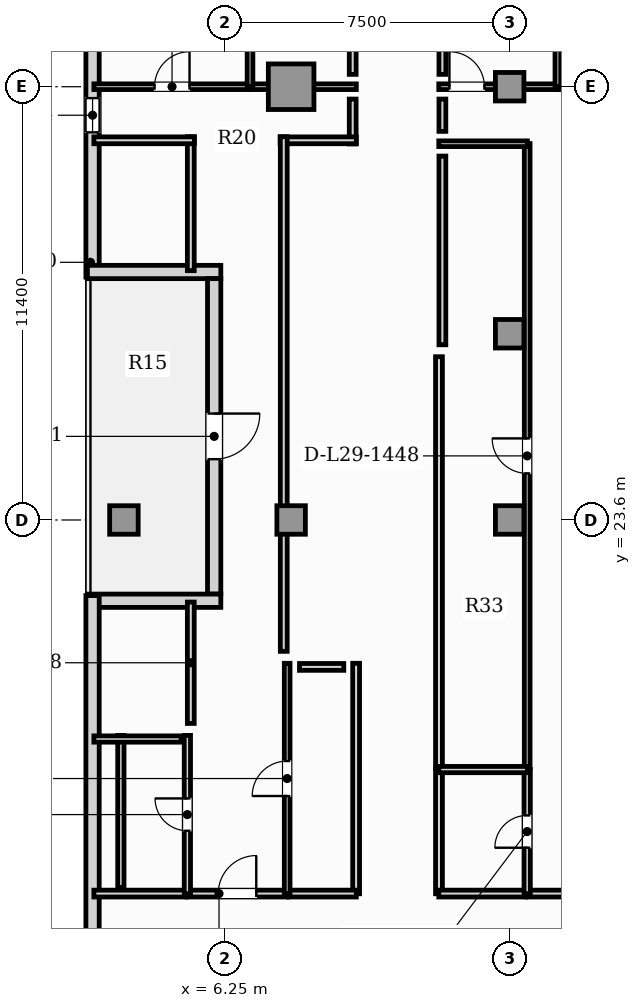
"""IFC4 building model, lengths in metres.
Left out: names, types, materials, properties, quantities, classifications, styles, units other than length and angle.
Written with IfcOpenShell. Run it as: python <this file> out.ifc"""

import sys

from ifc_helpers import new_model, si_unit, direction, frame, frame_2d, origin, origin_2d, place, context, subcontext, project, spatial, rectangle, hollow_rectangle, extrude, element, fill, save


model = new_model("IFC4")
c1 = context("Model", 3, precision=1e-05, world=origin(), true_north=direction((0.0, 1.0)))
c2 = subcontext(c1, "Body", "Model", "MODEL_VIEW")
j1 = project(units=[si_unit("LENGTHUNIT", "METRE"), si_unit("PLANEANGLEUNIT", "RADIAN")], contexts=[c1])
p1 = place(None, origin())
s1 = spatial("IfcSite", under=j1, at=p1, CompositionType="ELEMENT")
p2 = place(p1, origin())
s2 = spatial("IfcBuilding", under=s1, at=p2, CompositionType="ELEMENT")
p3 = place(p2, frame((0.0, 0.0, 119.55)))
s3 = spatial("IfcBuildingStorey", under=s2, at=p3, CompositionType="ELEMENT", Elevation=119.55)
p4 = place(p3, frame((8.0, 35.0, 0.0), z_axis=(0.0, 0.0, 1.0), x_axis=(1.0, 0.0, 0.0)))
e1 = element("IfcColumn", 1, at=p4, inside=s3, PredefinedType="USERDEFINED", context=c2, shape_type="SweptSolid", body=[
    extrude(hollow_rectangle(XDim=1.2, YDim=1.2, WallThickness=0.07, at=origin_2d()), origin(), (0.0, 0.0, 1.0), 3.85),
])
for number, where, z_axis, x_axis in (
    (2, (3.6, 23.6, 0.0), (0.0, 0.0, 1.0), (1.0, 0.0, 0.0)),
    (3, (8.0, 23.6, 0.0), (0.0, 0.0, 1.0), (1.0, 0.0, 0.0)),
    (4, (13.75, 23.6, 0.0), (0.0, 0.0, 1.0), (1.0, 0.0, 0.0)),
    (5, (13.75, 28.5, 0.0), (0.0, 0.0, 1.0), (1.0, 0.0, 0.0)),
    (6, (13.75, 35.0, 0.0), (0.0, 0.0, 1.0), (1.0, 0.0, 0.0)),
):
    element("IfcColumn", number, at=place(p3, frame(where, z_axis=z_axis, x_axis=x_axis)), inside=s3, PredefinedType="COLUMN", context=c2, shape_type="SweptSolid", body=[
        extrude(rectangle(XDim=0.75, YDim=0.75, at=origin_2d()), origin(), (0.0, 0.0, 1.0), 3.85),
    ])
p5 = place(p3, frame((2.775, 39.96, 0.0), z_axis=(0.0, 0.0, 1.0), x_axis=(0.0, -1.0, 0.0)))
e7 = element("IfcWall", 7, at=p5, inside=s3, PredefinedType="SOLIDWALL", context=c2, shape_type="SweptSolid", body=[
    extrude(rectangle(XDim=9.97, YDim=0.35, at=frame_2d((4.985, 0.0))), origin(), (0.0, 0.0, 1.0), 3.6),
])
p6 = place(p5, frame((5.26, 0.0, 0.95)))
e8 = element("IfcOpeningElement", 8, at=p6, cuts=e7, PredefinedType="OPENING", context=c2, shape_type="SweptSolid", body=[
    extrude(rectangle(XDim=0.9, YDim=1.5, at=frame_2d((0.45, 0.75))), frame((0.0, 0.185, 0.0), z_axis=(0.0, -1.0, 0.0), x_axis=(1.0, 0.0, 0.0)), (0.0, 0.0, 1.0), 0.37),
])
p7 = place(p3, frame((2.64, 30.125, 0.0), z_axis=(0.0, 0.0, 1.0), x_axis=(1.0, 0.0, 0.0)))
e9 = element("IfcWall", 9, at=p7, inside=s3, PredefinedType="SOLIDWALL", context=c2, shape_type="SweptSolid", body=[
    extrude(rectangle(XDim=3.51, YDim=0.35, at=frame_2d((1.755, 0.0))), origin(), (0.0, 0.0, 1.0), 3.6),
])
p8 = place(p3, frame((5.975, 29.95, 0.0), z_axis=(0.0, 0.0, 1.0), x_axis=(0.0, -1.0, 0.0)))
e10 = element("IfcWall", 10, at=p8, inside=s3, PredefinedType="SOLIDWALL", context=c2, shape_type="SweptSolid", body=[
    extrude(rectangle(XDim=8.3, YDim=0.35, at=frame_2d((4.15, 0.0))), origin(), (0.0, 0.0, 1.0), 3.6),
])
p9 = place(p8, frame((3.55, 0.0, 0.0)))
e11 = element("IfcOpeningElement", 11, at=p9, cuts=e10, PredefinedType="OPENING", context=c2, shape_type="SweptSolid", body=[
    extrude(rectangle(XDim=1.2, YDim=2.2, at=frame_2d((0.6, 1.1))), frame((0.0, 0.185, 0.0), z_axis=(0.0, -1.0, 0.0), x_axis=(1.0, 0.0, 0.0)), (0.0, 0.0, 1.0), 0.37),
])
p10 = place(p3, frame((6.15, 21.475, 0.0), z_axis=(0.0, 0.0, 1.0), x_axis=(-1.0, 0.0, 0.0)))
e12 = element("IfcWall", 12, at=p10, inside=s3, PredefinedType="SOLIDWALL", context=c2, shape_type="SweptSolid", body=[
    extrude(rectangle(XDim=3.51, YDim=0.35, at=frame_2d((1.755, 0.0))), origin(), (0.0, 0.0, 1.0), 3.6),
])
p11 = place(p3, frame((2.775, 21.61, 0.0), z_axis=(0.0, 0.0, 1.0), x_axis=(0.0, -1.0, 0.0)))
e13 = element("IfcWall", 13, at=p11, inside=s3, PredefinedType="SOLIDWALL", context=c2, shape_type="SweptSolid", body=[
    extrude(rectangle(XDim=18.37, YDim=0.35, at=frame_2d((9.185, 0.0))), origin(), (0.0, 0.0, 1.0), 3.6),
])
p12 = place(p3, frame((5.265, 13.77, 0.0), z_axis=(0.0, 0.0, 1.0), x_axis=(1.0, 0.0, 0.0)))
e14 = element("IfcWall", 14, at=p12, inside=s3, PredefinedType="PARTITIONING", context=c2, shape_type="SweptSolid", body=[
    extrude(rectangle(XDim=2.636, YDim=0.18, at=frame_2d((1.318, 0.0))), origin(), (0.0, 0.0, 1.0), 3.6),
])
p13 = place(p12, frame((0.818, 0.0, 0.0)))
e15 = element("IfcOpeningElement", 15, at=p13, cuts=e14, PredefinedType="OPENING", context=c2, shape_type="SweptSolid", body=[
    extrude(rectangle(XDim=1.0, YDim=2.15, at=frame_2d((0.5, 1.075))), frame((0.0, 0.1, 0.0), z_axis=(0.0, -1.0, 0.0), x_axis=(1.0, 0.0, 0.0)), (0.0, 0.0, 1.0), 0.2),
])
p14 = place(p3, frame((2.81, 13.77, 0.0), z_axis=(0.0, 0.0, 1.0), x_axis=(1.0, 0.0, 0.0)))
e16 = element("IfcWall", 16, at=p14, inside=s3, PredefinedType="PARTITIONING", context=c2, shape_type="SweptSolid", body=[
    extrude(rectangle(XDim=2.425, YDim=0.18, at=frame_2d((1.212, 0.0))), origin(), (0.0, 0.0, 1.0), 3.6),
])
p15 = place(p3, frame((9.71, 13.765, 0.0), z_axis=(0.0, 0.0, 1.0), x_axis=(0.0, 1.0, 0.0)))
e17 = element("IfcWall", 17, at=p15, inside=s3, PredefinedType="PARTITIONING", context=c2, shape_type="SweptSolid", body=[
    extrude(rectangle(XDim=6.064, YDim=0.18, at=frame_2d((3.032, 0.0))), origin(), (0.0, 0.0, 1.0), 3.6),
])
p16 = place(p3, frame((7.931, 13.77, 0.0), z_axis=(0.0, 0.0, 1.0), x_axis=(1.0, 0.0, 0.0)))
e18 = element("IfcWall", 18, at=p16, inside=s3, PredefinedType="PARTITIONING", context=c2, shape_type="SweptSolid", body=[
    extrude(rectangle(XDim=1.784, YDim=0.18, at=frame_2d((0.892, 0.0))), origin(), (0.0, 0.0, 1.0), 3.6),
])
p17 = place(p3, frame((14.206, 13.77, 0.0), z_axis=(0.0, 0.0, 1.0), x_axis=(1.0, 0.0, 0.0)))
e19 = element("IfcWall", 19, at=p17, inside=s3, PredefinedType="PARTITIONING", context=c2, shape_type="SweptSolid", body=[
    extrude(rectangle(XDim=3.422, YDim=0.18, at=frame_2d((1.711, 0.0))), origin(), (0.0, 0.0, 1.0), 3.6),
])
p18 = place(p17, frame((1.211, 0.0, 0.0)))
e20 = element("IfcOpeningElement", 20, at=p18, cuts=e19, PredefinedType="OPENING", context=c2, shape_type="SweptSolid", body=[
    extrude(rectangle(XDim=1.0, YDim=2.15, at=frame_2d((0.5, 1.075))), frame((0.0, 0.1, 0.0), z_axis=(0.0, -1.0, 0.0), x_axis=(1.0, 0.0, 0.0)), (0.0, 0.0, 1.0), 0.2),
])
p19 = place(p3, frame((11.89, 13.765, 0.0), z_axis=(0.0, 0.0, 1.0), x_axis=(0.0, 1.0, 0.0)))
e21 = element("IfcWall", 21, at=p19, inside=s3, PredefinedType="PARTITIONING", context=c2, shape_type="SweptSolid", body=[
    extrude(rectangle(XDim=3.273, YDim=0.18, at=frame_2d((1.636, 0.0))), origin(), (0.0, 0.0, 1.0), 3.6),
])
p20 = place(p3, frame((11.885, 13.77, 0.0), z_axis=(0.0, 0.0, 1.0), x_axis=(1.0, 0.0, 0.0)))
e22 = element("IfcWall", 22, at=p20, inside=s3, PredefinedType="PARTITIONING", context=c2, shape_type="SweptSolid", body=[
    extrude(rectangle(XDim=2.291, YDim=0.18, at=frame_2d((1.146, 0.0))), origin(), (0.0, 0.0, 1.0), 3.6),
])
p21 = place(p3, frame((11.89, 17.068, 0.0), z_axis=(0.0, 0.0, 1.0), x_axis=(0.0, 1.0, 0.0)))
e23 = element("IfcWall", 23, at=p21, inside=s3, PredefinedType="PARTITIONING", context=c2, shape_type="SweptSolid", body=[
    extrude(rectangle(XDim=10.827, YDim=0.18, at=frame_2d((5.414, 0.0))), origin(), (0.0, 0.0, 1.0), 3.6),
])
p22 = place(p3, frame((5.27, 13.765, 0.0), z_axis=(0.0, 0.0, 1.0), x_axis=(0.0, 1.0, 0.0)))
e24 = element("IfcWall", 24, at=p22, inside=s3, PredefinedType="PLUMBINGWALL", context=c2, shape_type="SweptSolid", body=[
    extrude(rectangle(XDim=4.167, YDim=0.165, at=frame_2d((2.083, 0.0))), origin(), (0.0, 0.0, 1.0), 3.6),
])
p23 = place(p22, frame((1.658, 0.0, 0.0)))
e25 = element("IfcOpeningElement", 25, at=p23, cuts=e24, PredefinedType="OPENING", context=c2, shape_type="SweptSolid", body=[
    extrude(rectangle(XDim=0.85, YDim=2.1, at=frame_2d((0.425, 1.05))), frame((0.0, 0.093, 0.0), z_axis=(0.0, -1.0, 0.0), x_axis=(1.0, 0.0, 0.0)), (0.0, 0.0, 1.0), 0.185),
])
p24 = place(p3, frame((7.896, 13.765, 0.0), z_axis=(0.0, 0.0, 1.0), x_axis=(0.0, 1.0, 0.0)))
e26 = element("IfcWall", 26, at=p24, inside=s3, PredefinedType="PARTITIONING", context=c2, shape_type="SweptSolid", body=[
    extrude(rectangle(XDim=6.064, YDim=0.15, at=frame_2d((3.032, 0.0))), origin(), (0.0, 0.0, 1.0), 3.055),
])
p25 = place(p24, frame((2.572, 0.0, 0.0)))
e27 = element("IfcOpeningElement", 27, at=p25, cuts=e26, PredefinedType="OPENING", context=c2, shape_type="SweptSolid", body=[
    extrude(rectangle(XDim=0.92, YDim=2.1, at=frame_2d((0.46, 1.05))), frame((0.0, 0.085, 0.0), z_axis=(0.0, -1.0, 0.0), x_axis=(1.0, 0.0, 0.0)), (0.0, 0.0, 1.0), 0.17),
])
p26 = place(p3, frame((2.81, 35.0, 0.0), z_axis=(0.0, 0.0, 1.0), x_axis=(1.0, 0.0, 0.0)))
e28 = element("IfcWall", 28, at=p26, inside=s3, PredefinedType="PARTITIONING", context=c2, shape_type="SweptSolid", body=[
    extrude(rectangle(XDim=4.113, YDim=0.15, at=frame_2d((2.057, 0.0))), origin(), (0.0, 0.0, 1.0), 3.6),
])
p27 = place(p26, frame((1.597, 0.0, 0.0)))
e29 = element("IfcOpeningElement", 29, at=p27, cuts=e28, PredefinedType="OPENING", context=c2, shape_type="SweptSolid", body=[
    extrude(rectangle(XDim=0.92, YDim=2.1, at=frame_2d((0.46, 1.05))), frame((0.0, 0.085, 0.0), z_axis=(0.0, -1.0, 0.0), x_axis=(1.0, 0.0, 0.0)), (0.0, 0.0, 1.0), 0.17),
])
p28 = place(p3, frame((6.953, 35.0, 0.0), z_axis=(0.0, 0.0, 1.0), x_axis=(1.0, 0.0, 0.0)))
e30 = element("IfcWall", 30, at=p28, inside=s3, PredefinedType="PARTITIONING", context=c2, shape_type="SweptSolid", body=[
    extrude(rectangle(XDim=2.762, YDim=0.15, at=frame_2d((1.381, 0.0))), origin(), (0.0, 0.0, 1.0), 2.983),
])
p29 = place(p3, frame((6.918, 34.995, 0.0), z_axis=(0.0, 0.0, 1.0), x_axis=(0.0, 1.0, 0.0)))
e31 = element("IfcWall", 31, at=p29, inside=s3, PredefinedType="PARTITIONING", context=c2, shape_type="SweptSolid", body=[
    extrude(rectangle(XDim=7.995, YDim=0.15, at=frame_2d((3.998, 0.0))), origin(), (0.0, 0.0, 1.0), 3.6),
])
p30 = place(p29, frame((3.23, 0.0, 0.0)))
e32 = element("IfcOpeningElement", 32, at=p30, cuts=e31, PredefinedType="OPENING", context=c2, shape_type="SweptSolid", body=[
    extrude(rectangle(XDim=0.92, YDim=2.1, at=frame_2d((0.46, 1.05))), frame((0.0, 0.085, 0.0), z_axis=(0.0, -1.0, 0.0), x_axis=(1.0, 0.0, 0.0)), (0.0, 0.0, 1.0), 0.17),
])
p31 = place(p3, frame((14.211, 13.765, 0.0), z_axis=(0.0, 0.0, 1.0), x_axis=(0.0, 1.0, 0.0)))
e33 = element("IfcWall", 33, at=p31, inside=s3, PredefinedType="PLUMBINGWALL", context=c2, shape_type="SweptSolid", body=[
    extrude(rectangle(XDim=3.273, YDim=0.165, at=frame_2d((1.636, 0.0))), origin(), (0.0, 0.0, 1.0), 3.6),
])
p32 = place(p31, frame((1.211, 0.0, 0.0)))
e34 = element("IfcOpeningElement", 34, at=p32, cuts=e33, PredefinedType="OPENING", context=c2, shape_type="SweptSolid", body=[
    extrude(rectangle(XDim=0.85, YDim=2.1, at=frame_2d((0.425, 1.05))), frame((0.0, 0.093, 0.0), z_axis=(0.0, -1.0, 0.0), x_axis=(1.0, 0.0, 0.0)), (0.0, 0.0, 1.0), 0.185),
])
p33 = place(p3, frame((14.211, 17.068, 0.0), z_axis=(0.0, 0.0, 1.0), x_axis=(0.0, 1.0, 0.0)))
e35 = element("IfcWall", 35, at=p33, inside=s3, PredefinedType="PARTITIONING", context=c2, shape_type="SweptSolid", body=[
    extrude(rectangle(XDim=16.437, YDim=0.15, at=frame_2d((8.219, 0.0))), origin(), (0.0, 0.0, 1.0), 3.6),
])
p34 = place(p33, frame((7.759, 0.0, 0.0)))
e36 = element("IfcOpeningElement", 36, at=p34, cuts=e35, PredefinedType="OPENING", context=c2, shape_type="SweptSolid", body=[
    extrude(rectangle(XDim=0.92, YDim=2.1, at=frame_2d((0.46, 1.05))), frame((0.0, 0.085, 0.0), z_axis=(0.0, -1.0, 0.0), x_axis=(1.0, 0.0, 0.0)), (0.0, 0.0, 1.0), 0.17),
])
p35 = place(p3, frame((11.885, 33.5, 0.0), z_axis=(0.0, 0.0, 1.0), x_axis=(1.0, 0.0, 0.0)))
e37 = element("IfcWall", 37, at=p35, inside=s3, PredefinedType="PARTITIONING", context=c2, shape_type="SweptSolid", body=[
    extrude(rectangle(XDim=2.331, YDim=0.15, at=frame_2d((1.166, 0.0))), origin(), (0.0, 0.0, 1.0), 3.6),
])
p36 = place(p3, frame((11.885, 35.0, 0.0), z_axis=(0.0, 0.0, 1.0), x_axis=(1.0, 0.0, 0.0)))
e38 = element("IfcWall", 38, at=p36, inside=s3, PredefinedType="PARTITIONING", context=c2, shape_type="SweptSolid", body=[
    extrude(rectangle(XDim=3.139, YDim=0.15, at=frame_2d((1.569, 0.0))), origin(), (0.0, 0.0, 1.0), 2.983),
])
p37 = place(p36, frame((0.28, 0.0, 0.0)))
e39 = element("IfcOpeningElement", 39, at=p37, cuts=e38, PredefinedType="OPENING", context=c2, shape_type="SweptSolid", body=[
    extrude(rectangle(XDim=0.92, YDim=2.1, at=frame_2d((0.46, 1.05))), frame((0.0, 0.085, 0.0), z_axis=(0.0, -1.0, 0.0), x_axis=(1.0, 0.0, 0.0)), (0.0, 0.0, 1.0), 0.17),
])
p38 = place(p3, frame((15.054, 35.0, 0.0), z_axis=(0.0, 0.0, 1.0), x_axis=(1.0, 0.0, 0.0)))
e40 = element("IfcWall", 40, at=p38, inside=s3, PredefinedType="PARTITIONING", context=c2, shape_type="SweptSolid", body=[
    extrude(rectangle(XDim=2.478, YDim=0.15, at=frame_2d((1.239, 0.0))), origin(), (0.0, 0.0, 1.0), 2.983),
])
p39 = place(p38, frame((0.779, 0.0, 0.0)))
e41 = element("IfcOpeningElement", 41, at=p39, cuts=e40, PredefinedType="OPENING", context=c2, shape_type="SweptSolid", body=[
    extrude(rectangle(XDim=0.92, YDim=2.1, at=frame_2d((0.46, 1.05))), frame((0.0, 0.085, 0.0), z_axis=(0.0, -1.0, 0.0), x_axis=(1.0, 0.0, 0.0)), (0.0, 0.0, 1.0), 0.17),
])
p40 = place(p3, frame((11.885, 17.033, 0.0), z_axis=(0.0, 0.0, 1.0), x_axis=(1.0, 0.0, 0.0)))
e42 = element("IfcWall", 42, at=p40, inside=s3, PredefinedType="PLUMBINGWALL", context=c2, shape_type="SweptSolid", body=[
    extrude(rectangle(XDim=2.331, YDim=0.165, at=frame_2d((1.166, 0.0))), origin(), (0.0, 0.0, 1.0), 3.6),
])
p41 = place(p3, frame((15.019, 34.995, 0.0), z_axis=(0.0, 0.0, 1.0), x_axis=(0.0, 1.0, 0.0)))
e43 = element("IfcWall", 43, at=p41, inside=s3, PredefinedType="PARTITIONING", context=c2, shape_type="SweptSolid", body=[
    extrude(rectangle(XDim=7.907, YDim=0.15, at=frame_2d((3.954, 0.0))), origin(), (0.0, 0.0, 1.0), 3.6),
])
p42 = place(p3, frame((5.36, 18.247, 0.0), z_axis=(0.0, 0.0, 1.0), x_axis=(0.0, 1.0, 0.0)))
e44 = element("IfcWall", 44, at=p42, inside=s3, PredefinedType="PARTITIONING", context=c2, shape_type="SweptSolid", body=[
    extrude(rectangle(XDim=3.193, YDim=0.18, at=frame_2d((1.597, 0.0))), origin(), (0.0, 0.0, 1.0), 3.6),
])
p43 = place(p3, frame((5.36, 30.16, 0.0), z_axis=(0.0, 0.0, 1.0), x_axis=(0.0, 1.0, 0.0)))
e45 = element("IfcWall", 45, at=p43, inside=s3, PredefinedType="PARTITIONING", context=c2, shape_type="SweptSolid", body=[
    extrude(rectangle(XDim=3.525, YDim=0.18, at=frame_2d((1.763, 0.0))), origin(), (0.0, 0.0, 1.0), 3.6),
])
p44 = place(p3, frame((5.455, 33.59, 0.0), z_axis=(0.0, 0.0, 1.0), x_axis=(-1.0, 0.0, 0.0)))
e46 = element("IfcWall", 46, at=p44, inside=s3, PredefinedType="PARTITIONING", context=c2, shape_type="SweptSolid", body=[
    extrude(rectangle(XDim=2.645, YDim=0.18, at=frame_2d((1.322, 0.0))), origin(), (0.0, 0.0, 1.0), 3.6),
])
p45 = place(p3, frame((9.62, 34.675, 0.0), z_axis=(0.0, 0.0, 1.0), x_axis=(0.0, -1.0, 0.0)))
e47 = element("IfcWall", 47, at=p45, inside=s3, PredefinedType="PARTITIONING", context=c2, shape_type="SweptSolid", body=[
    extrude(rectangle(XDim=1.18, YDim=0.18, at=frame_2d((0.59, 0.0))), origin(), (0.0, 0.0, 1.0), 3.6),
])
p46 = place(p3, frame((9.715, 33.59, 0.0), z_axis=(0.0, 0.0, 1.0), x_axis=(-1.0, 0.0, 0.0)))
e48 = element("IfcWall", 48, at=p46, inside=s3, PredefinedType="PARTITIONING", context=c2, shape_type="SweptSolid", body=[
    extrude(rectangle(XDim=2.004, YDim=0.18, at=frame_2d((1.002, 0.0))), origin(), (0.0, 0.0, 1.0), 3.6),
])
p47 = place(p3, frame((7.806, 33.685, 0.0), z_axis=(0.0, 0.0, 1.0), x_axis=(0.0, -1.0, 0.0)))
e49 = element("IfcWall", 49, at=p47, inside=s3, PredefinedType="PARTITIONING", context=c2, shape_type="SweptSolid", body=[
    extrude(rectangle(XDim=13.541, YDim=0.18, at=frame_2d((6.771, 0.0))), origin(), (0.0, 0.0, 1.0), 3.055),
])
p48 = place(p3, frame((3.52, 13.935, 0.0), z_axis=(0.0, 0.0, 1.0), x_axis=(0.0, 1.0, 0.0)))
e50 = element("IfcWall", 50, at=p48, inside=s3, PredefinedType="PLUMBINGWALL", context=c2, shape_type="SweptSolid", body=[
    extrude(rectangle(XDim=3.997, YDim=0.165, at=frame_2d((1.998, 0.0))), origin(), (0.0, 0.0, 1.0), 3.6),
])
p49 = place(p3, frame((2.81, 17.837, 0.0), z_axis=(0.0, 0.0, 1.0), x_axis=(1.0, 0.0, 0.0)))
e51 = element("IfcWall", 51, at=p49, inside=s3, PredefinedType="PLUMBINGWALL", context=c2, shape_type="SweptSolid", body=[
    extrude(rectangle(XDim=2.295, YDim=0.165, at=frame_2d((1.147, 0.0))), origin(), (0.0, 0.0, 1.0), 3.6),
])
p50 = place(p3, frame((8.221, 19.734, 0.0), z_axis=(0.0, 0.0, 1.0), x_axis=(1.0, 0.0, 0.0)))
e52 = element("IfcWall", 52, at=p50, inside=s3, PredefinedType="PARTITIONING", context=c2, shape_type="SweptSolid", body=[
    extrude(rectangle(XDim=1.164, YDim=0.18, at=frame_2d((0.582, 0.0))), origin(), (0.0, 0.0, 1.0), 3.6),
])
p51 = place(p3, frame((9.62, 42.99, 0.0), z_axis=(0.0, 0.0, 1.0), x_axis=(0.0, -1.0, 0.0)))
e53 = element("IfcWall", 53, at=p51, inside=s3, PredefinedType="PARTITIONING", context=c2, shape_type="SweptSolid", body=[
    extrude(rectangle(XDim=7.665, YDim=0.18, at=frame_2d((3.833, 0.0))), origin(), (0.0, 0.0, 1.0), 3.6),
])
p52 = place(p3, frame((11.98, 33.825, 0.0), z_axis=(0.0, 0.0, 1.0), x_axis=(0.0, 1.0, 0.0)))
e54 = element("IfcWall", 54, at=p52, inside=s3, PredefinedType="PARTITIONING", context=c2, shape_type="SweptSolid", body=[
    extrude(rectangle(XDim=0.85, YDim=0.18, at=frame_2d((0.425, 0.0))), origin(), (0.0, 0.0, 1.0), 3.6),
])
p53 = place(p3, frame((11.98, 28.21, 0.0), z_axis=(0.0, 0.0, 1.0), x_axis=(0.0, 1.0, 0.0)))
e55 = element("IfcWall", 55, at=p53, inside=s3, PredefinedType="PARTITIONING", context=c2, shape_type="SweptSolid", body=[
    extrude(rectangle(XDim=4.965, YDim=0.18, at=frame_2d((2.482, 0.0))), origin(), (0.0, 0.0, 1.0), 3.6),
])
p54 = place(p3, frame((11.98, 35.325, 0.0), z_axis=(0.0, 0.0, 1.0), x_axis=(0.0, 1.0, 0.0)))
e56 = element("IfcWall", 56, at=p54, inside=s3, PredefinedType="PARTITIONING", context=c2, shape_type="SweptSolid", body=[
    extrude(rectangle(XDim=7.665, YDim=0.18, at=frame_2d((3.833, 0.0))), origin(), (0.0, 0.0, 1.0), 3.6),
])
p55 = place(p9, frame((1.2, 0.0, 0.0), z_axis=(0.0, 0.0, 1.0), x_axis=(-1.0, 0.0, 0.0)))
e57 = element("IfcDoor", 57, at=p55, inside=s3, OperationType="SINGLE_SWING_RIGHT", PredefinedType="DOOR", context=c2, shape_type="SweptSolid", body=[
    extrude(rectangle(XDim=1.2, YDim=2.2, at=frame_2d((0.6, 1.1))), frame((0.0, 0.025, 0.0), z_axis=(0.0, -1.0, 0.0), x_axis=(1.0, 0.0, 0.0)), (0.0, 0.0, 1.0), 0.05),
])
fill(e11, e57)
p56 = place(p6, origin())
e58 = element("IfcWindow", 58, at=p56, inside=s3, PartitioningType="SINGLE_PANEL", PredefinedType="WINDOW", context=c2, shape_type="SweptSolid", body=[
    extrude(rectangle(XDim=0.9, YDim=1.5, at=frame_2d((0.45, 0.75))), frame((0.0, 0.03, 0.0), z_axis=(0.0, -1.0, 0.0), x_axis=(1.0, 0.0, 0.0)), (0.0, 0.0, 1.0), 0.06),
])
fill(e8, e58)
p57 = place(p13, origin())
e59 = element("IfcDoor", 59, at=p57, inside=s3, OperationType="SINGLE_SWING_RIGHT", PredefinedType="DOOR", context=c2, shape_type="SweptSolid", body=[
    extrude(rectangle(XDim=1.0, YDim=2.15, at=frame_2d((0.5, 1.075))), frame((0.0, 0.025, 0.0), z_axis=(0.0, -1.0, 0.0), x_axis=(1.0, 0.0, 0.0)), (0.0, 0.0, 1.0), 0.05),
])
fill(e15, e59)
p58 = place(p23, origin())
e60 = element("IfcDoor", 60, at=p58, inside=s3, OperationType="SINGLE_SWING_RIGHT", PredefinedType="DOOR", context=c2, shape_type="SweptSolid", body=[
    extrude(rectangle(XDim=0.85, YDim=2.1, at=frame_2d((0.425, 1.05))), frame((0.0, 0.025, 0.0), z_axis=(0.0, -1.0, 0.0), x_axis=(1.0, 0.0, 0.0)), (0.0, 0.0, 1.0), 0.05),
])
fill(e25, e60)
p59 = place(p25, origin())
e61 = element("IfcDoor", 61, at=p59, inside=s3, OperationType="SINGLE_SWING_LEFT", PredefinedType="DOOR", context=c2, shape_type="SweptSolid", body=[
    extrude(rectangle(XDim=0.92, YDim=2.1, at=frame_2d((0.46, 1.05))), frame((0.0, 0.025, 0.0), z_axis=(0.0, -1.0, 0.0), x_axis=(1.0, 0.0, 0.0)), (0.0, 0.0, 1.0), 0.05),
])
fill(e27, e61)
p60 = place(p27, origin())
e62 = element("IfcDoor", 62, at=p60, inside=s3, OperationType="SINGLE_SWING_RIGHT", PredefinedType="DOOR", context=c2, shape_type="SweptSolid", body=[
    extrude(rectangle(XDim=0.92, YDim=2.1, at=frame_2d((0.46, 1.05))), frame((0.0, 0.025, 0.0), z_axis=(0.0, -1.0, 0.0), x_axis=(1.0, 0.0, 0.0)), (0.0, 0.0, 1.0), 0.05),
])
fill(e29, e62)
p61 = place(p32, origin())
e63 = element("IfcDoor", 63, at=p61, inside=s3, OperationType="SINGLE_SWING_LEFT", PredefinedType="DOOR", context=c2, shape_type="SweptSolid", body=[
    extrude(rectangle(XDim=0.85, YDim=2.1, at=frame_2d((0.425, 1.05))), frame((0.0, 0.025, 0.0), z_axis=(0.0, -1.0, 0.0), x_axis=(1.0, 0.0, 0.0)), (0.0, 0.0, 1.0), 0.05),
])
fill(e34, e63)
p62 = place(p34, origin())
e64 = element("IfcDoor", 64, at=p62, inside=s3, OperationType="SINGLE_SWING_RIGHT", PredefinedType="DOOR", context=c2, shape_type="SweptSolid", body=[
    extrude(rectangle(XDim=0.92, YDim=2.1, at=frame_2d((0.46, 1.05))), frame((0.0, 0.025, 0.0), z_axis=(0.0, -1.0, 0.0), x_axis=(1.0, 0.0, 0.0)), (0.0, 0.0, 1.0), 0.05),
])
fill(e36, e64)
p63 = place(p37, origin())
e65 = element("IfcDoor", 65, at=p63, inside=s3, OperationType="SINGLE_SWING_LEFT", PredefinedType="DOOR", context=c2, shape_type="SweptSolid", body=[
    extrude(rectangle(XDim=0.92, YDim=2.1, at=frame_2d((0.46, 1.05))), frame((0.0, 0.025, 0.0), z_axis=(0.0, -1.0, 0.0), x_axis=(1.0, 0.0, 0.0)), (0.0, 0.0, 1.0), 0.05),
])
fill(e39, e65)
save(model, sys.argv[1])
